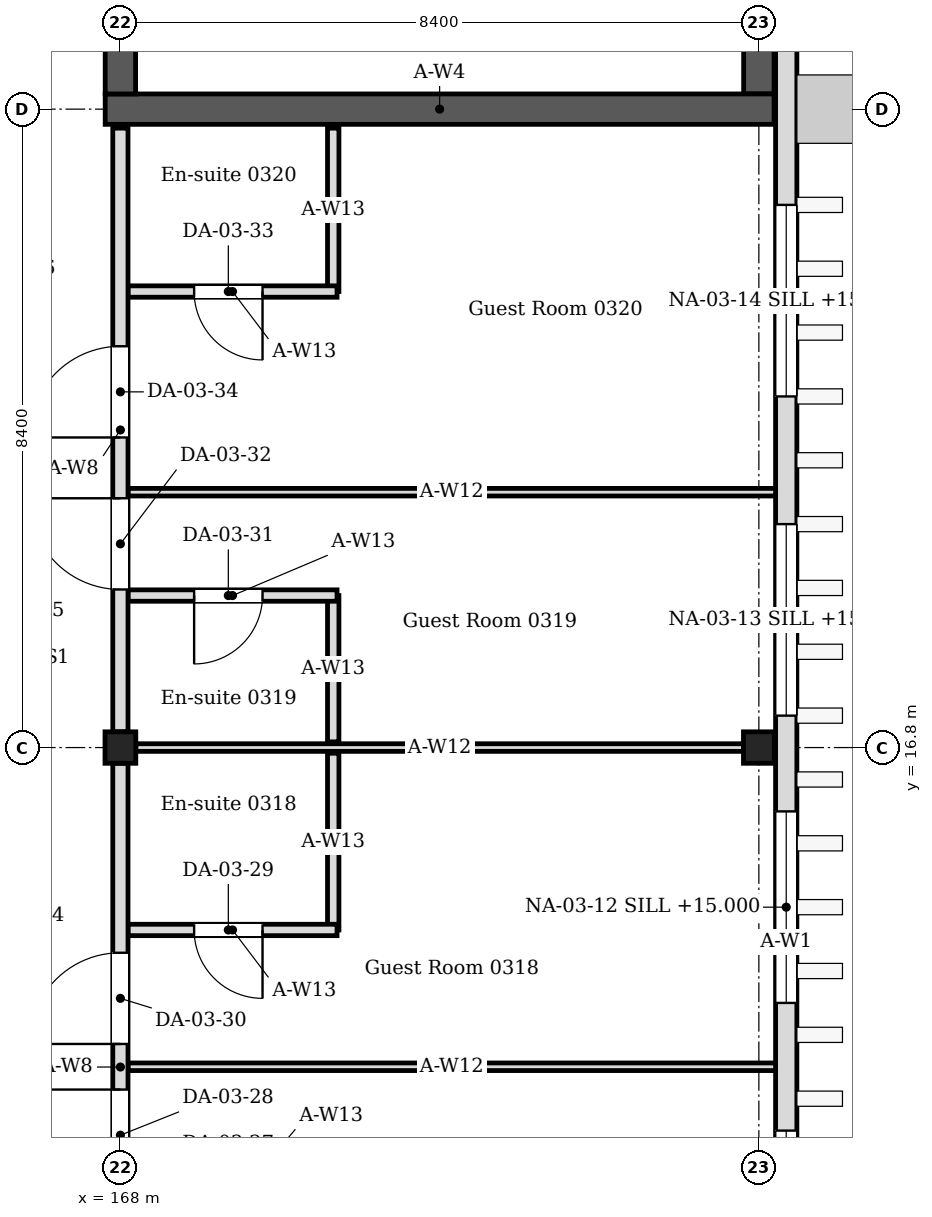
"""IFC4 building model, lengths in metres.
Left out: names, types, materials, properties, quantities, classifications, styles, units other than length and angle.
Written with IfcOpenShell. Run it as: python <this file> out.ifc"""

import sys

from ifc_helpers import new_model, si_unit, direction, frame, frame_2d, origin, origin_2d, place, context, subcontext, project, spatial, rectangle, i_section, extrude, element, fill, save


model = new_model("IFC4")
c1 = context("Model", 3, precision=1e-05, world=origin(), true_north=direction((0.0, 1.0)))
c2 = subcontext(c1, "Body", "Model", "MODEL_VIEW")
j1 = project(units=[si_unit("LENGTHUNIT", "METRE"), si_unit("PLANEANGLEUNIT", "RADIAN")], contexts=[c1])
p1 = place(None, origin())
s1 = spatial("IfcSite", under=j1, at=p1, CompositionType="ELEMENT")
p2 = place(p1, origin())
s2 = spatial("IfcBuilding", under=s1, at=p2, CompositionType="ELEMENT")
p3 = place(p2, frame((0.0, 0.0, 14.4)))
s3 = spatial("IfcBuildingStorey", under=s2, at=p3, CompositionType="ELEMENT", Elevation=14.4)
for number, where, z_axis, x_axis in (
    (1, (168.0, 16.8, 0.0), (0.0, 0.0, 1.0), (1.0, 0.0, 0.0)),
    (2, (176.4, 16.8, 0.0), (0.0, 0.0, 1.0), (1.0, 0.0, 0.0)),
):
    element("IfcColumn", number, at=place(p3, frame(where, z_axis=z_axis, x_axis=x_axis)), inside=s3, PredefinedType="COLUMN", context=c2, shape_type="SweptSolid", body=[
        extrude(i_section(OverallWidth=0.405, OverallDepth=0.414, WebThickness=0.018, FlangeThickness=0.028, FilletRadius=0.022, at=origin_2d()), origin(), (0.0, 0.0, 1.0), 4.2),
    ])
p4 = place(p3, frame((167.8, 25.2, 0.0), z_axis=(0.0, 0.0, 1.0), x_axis=(1.0, 0.0, 0.0)))
e3 = element("IfcWall", 3, at=p4, inside=s3, PredefinedType="SOLIDWALL", context=c2, shape_type="SweptSolid", body=[
    extrude(rectangle(XDim=8.8, YDim=0.4, at=frame_2d((4.4, 0.0))), origin(), (0.0, 0.0, 1.0), 4.05),
])
p5 = place(p3, frame((168.0, 25.4, 0.0), z_axis=(0.0, 0.0, 1.0), x_axis=(0.0, 1.0, 0.0)))
e4 = element("IfcWall", 4, at=p5, inside=s3, PredefinedType="SOLIDWALL", context=c2, shape_type="SweptSolid", body=[
    extrude(rectangle(XDim=16.4, YDim=0.4, at=frame_2d((8.2, 0.0))), origin(), (0.0, 0.0, 1.0), 4.05),
])
p6 = place(p5, frame((1.0, 0.0, 0.0)))
e5 = element("IfcOpeningElement", 5, at=p6, cuts=e4, PredefinedType="OPENING", context=c2, shape_type="SweptSolid", body=[
    extrude(rectangle(XDim=1.0, YDim=2.1, at=frame_2d((0.5, 1.05))), frame((0.0, 0.21, 0.0), z_axis=(0.0, -1.0, 0.0), x_axis=(1.0, 0.0, 0.0)), (0.0, 0.0, 1.0), 0.42),
])
p7 = place(p5, frame((14.4, 0.0, 0.0)))
e6 = element("IfcOpeningElement", 6, at=p7, cuts=e4, PredefinedType="OPENING", context=c2, shape_type="SweptSolid", body=[
    extrude(rectangle(XDim=1.4, YDim=2.1, at=frame_2d((0.7, 1.05))), frame((0.0, 0.21, 0.0), z_axis=(0.0, -1.0, 0.0), x_axis=(1.0, 0.0, 0.0)), (0.0, 0.0, 1.0), 0.42),
])
p8 = place(p3, frame((176.4, 25.4, 0.0), z_axis=(0.0, 0.0, 1.0), x_axis=(0.0, 1.0, 0.0)))
e7 = element("IfcWall", 7, at=p8, inside=s3, PredefinedType="SOLIDWALL", context=c2, shape_type="SweptSolid", body=[
    extrude(rectangle(XDim=16.4, YDim=0.4, at=frame_2d((8.2, 0.0))), origin(), (0.0, 0.0, 1.0), 4.05),
])
p9 = place(p3, frame((176.76, -0.22, 0.0), z_axis=(0.0, 0.0, 1.0), x_axis=(0.0, 1.0, 0.0)))
e8 = element("IfcWall", 8, at=p9, inside=s3, PredefinedType="SOLIDWALL", context=c2, shape_type="SweptSolid", body=[
    extrude(rectangle(XDim=42.57, YDim=0.28, at=frame_2d((21.285, 0.0))), origin(), (0.0, 0.0, 1.0), 4.05),
])
p10 = place(p9, frame((9.46, 0.0, 0.6)))
e9 = element("IfcOpeningElement", 9, at=p10, cuts=e8, PredefinedType="OPENING", context=c2, shape_type="SweptSolid", body=[
    extrude(rectangle(XDim=2.52, YDim=2.4, at=frame_2d((1.26, 1.2))), frame((0.0, 0.15, 0.0), z_axis=(0.0, -1.0, 0.0), x_axis=(1.0, 0.0, 0.0)), (0.0, 0.0, 1.0), 0.3),
])
p11 = place(p9, frame((13.66, 0.0, 0.6)))
e10 = element("IfcOpeningElement", 10, at=p11, cuts=e8, PredefinedType="OPENING", context=c2, shape_type="SweptSolid", body=[
    extrude(rectangle(XDim=2.52, YDim=2.4, at=frame_2d((1.26, 1.2))), frame((0.0, 0.15, 0.0), z_axis=(0.0, -1.0, 0.0), x_axis=(1.0, 0.0, 0.0)), (0.0, 0.0, 1.0), 0.3),
])
p12 = place(p9, frame((17.44, 0.0, 0.6)))
e11 = element("IfcOpeningElement", 11, at=p12, cuts=e8, PredefinedType="OPENING", context=c2, shape_type="SweptSolid", body=[
    extrude(rectangle(XDim=2.52, YDim=2.4, at=frame_2d((1.26, 1.2))), frame((0.0, 0.15, 0.0), z_axis=(0.0, -1.0, 0.0), x_axis=(1.0, 0.0, 0.0)), (0.0, 0.0, 1.0), 0.3),
])
p13 = place(p9, frame((21.64, 0.0, 0.6)))
e12 = element("IfcOpeningElement", 12, at=p13, cuts=e8, PredefinedType="OPENING", context=c2, shape_type="SweptSolid", body=[
    extrude(rectangle(XDim=2.52, YDim=2.4, at=frame_2d((1.26, 1.2))), frame((0.0, 0.15, 0.0), z_axis=(0.0, -1.0, 0.0), x_axis=(1.0, 0.0, 0.0)), (0.0, 0.0, 1.0), 0.3),
])
p14 = place(p3, frame((170.8, 14.4, 0.0), z_axis=(0.0, 0.0, 1.0), x_axis=(0.0, 1.0, 0.0)))
e13 = element("IfcWall", 13, at=p14, inside=s3, PredefinedType="PARTITIONING", context=c2, shape_type="SweptSolid", body=[
    extrude(rectangle(XDim=2.325, YDim=0.15, at=frame_2d((1.163, 0.0))), origin(), (0.0, 0.0, 1.0), 4.05),
])
p15 = place(p3, frame((170.85, 14.4, 0.0), z_axis=(0.0, 0.0, 1.0), x_axis=(-1.0, 0.0, 0.0)))
e14 = element("IfcWall", 14, at=p15, inside=s3, PredefinedType="PARTITIONING", context=c2, shape_type="SweptSolid", body=[
    extrude(rectangle(XDim=2.75, YDim=0.15, at=frame_2d((1.375, 0.0))), origin(), (0.0, 0.0, 1.0), 4.05),
])
p16 = place(p15, frame((0.98, 0.0, 0.0)))
e15 = element("IfcOpeningElement", 15, at=p16, cuts=e14, PredefinedType="OPENING", context=c2, shape_type="SweptSolid", body=[
    extrude(rectangle(XDim=0.9, YDim=2.1, at=frame_2d((0.45, 1.05))), frame((0.0, 0.085, 0.0), z_axis=(0.0, -1.0, 0.0), x_axis=(1.0, 0.0, 0.0)), (0.0, 0.0, 1.0), 0.17),
])
p17 = place(p3, frame((170.8, 16.875, 0.0), z_axis=(0.0, 0.0, 1.0), x_axis=(0.0, 1.0, 0.0)))
e16 = element("IfcWall", 16, at=p17, inside=s3, PredefinedType="PARTITIONING", context=c2, shape_type="SweptSolid", body=[
    extrude(rectangle(XDim=1.925, YDim=0.15, at=frame_2d((0.962, 0.0))), origin(), (0.0, 0.0, 1.0), 4.05),
])
p18 = place(p3, frame((170.85, 18.8, 0.0), z_axis=(0.0, 0.0, 1.0), x_axis=(-1.0, 0.0, 0.0)))
e17 = element("IfcWall", 17, at=p18, inside=s3, PredefinedType="PARTITIONING", context=c2, shape_type="SweptSolid", body=[
    extrude(rectangle(XDim=2.75, YDim=0.15, at=frame_2d((1.375, 0.0))), origin(), (0.0, 0.0, 1.0), 4.05),
])
p19 = place(p18, frame((0.98, 0.0, 0.0)))
e18 = element("IfcOpeningElement", 18, at=p19, cuts=e17, PredefinedType="OPENING", context=c2, shape_type="SweptSolid", body=[
    extrude(rectangle(XDim=0.9, YDim=2.1, at=frame_2d((0.45, 1.05))), frame((0.0, 0.085, 0.0), z_axis=(0.0, -1.0, 0.0), x_axis=(1.0, 0.0, 0.0)), (0.0, 0.0, 1.0), 0.17),
])
p20 = place(p3, frame((170.8, 22.8, 0.0), z_axis=(0.0, 0.0, 1.0), x_axis=(0.0, 1.0, 0.0)))
e19 = element("IfcWall", 19, at=p20, inside=s3, PredefinedType="PARTITIONING", context=c2, shape_type="SweptSolid", body=[
    extrude(rectangle(XDim=2.15, YDim=0.15, at=frame_2d((1.075, 0.0))), origin(), (0.0, 0.0, 1.0), 4.05),
])
p21 = place(p3, frame((170.85, 22.8, 0.0), z_axis=(0.0, 0.0, 1.0), x_axis=(-1.0, 0.0, 0.0)))
e20 = element("IfcWall", 20, at=p21, inside=s3, PredefinedType="PARTITIONING", context=c2, shape_type="SweptSolid", body=[
    extrude(rectangle(XDim=2.75, YDim=0.15, at=frame_2d((1.375, 0.0))), origin(), (0.0, 0.0, 1.0), 4.05),
])
p22 = place(p21, frame((0.98, 0.0, 0.0)))
e21 = element("IfcOpeningElement", 21, at=p22, cuts=e20, PredefinedType="OPENING", context=c2, shape_type="SweptSolid", body=[
    extrude(rectangle(XDim=0.9, YDim=2.1, at=frame_2d((0.45, 1.05))), frame((0.0, 0.085, 0.0), z_axis=(0.0, -1.0, 0.0), x_axis=(1.0, 0.0, 0.0)), (0.0, 0.0, 1.0), 0.17),
])
p23 = place(p3, frame((168.202, 16.8, 0.0), z_axis=(0.0, 0.0, 1.0), x_axis=(1.0, 0.0, 0.0)))
e22 = element("IfcWall", 22, at=p23, inside=s3, PredefinedType="PARTITIONING", context=c2, shape_type="SweptSolid", body=[
    extrude(rectangle(XDim=7.995, YDim=0.1, at=frame_2d((3.998, 0.0))), origin(), (0.0, 0.0, 1.0), 3.604),
])
for number, where, z_axis, x_axis in (
    (23, (168.1, 12.6, 0.0), (0.0, 0.0, 1.0), (1.0, 0.0, 0.0)),
    (24, (168.1, 20.16, 0.0), (0.0, 0.0, 1.0), (1.0, 0.0, 0.0)),
):
    element("IfcWall", number, at=place(p3, frame(where, z_axis=z_axis, x_axis=x_axis)), inside=s3, PredefinedType="PARTITIONING", context=c2, shape_type="SweptSolid", body=[
        extrude(rectangle(XDim=8.52, YDim=0.1, at=frame_2d((4.26, 0.0))), origin(), (0.0, 0.0, 1.0), 3.604),
    ])
p24 = place(p3, frame((168.0, 8.6, 0.0), z_axis=(0.0, 0.0, 1.0), x_axis=(0.0, 1.0, 0.0)))
e25 = element("IfcWall", 25, at=p24, inside=s3, PredefinedType="PARTITIONING", context=c2, shape_type="SweptSolid", body=[
    extrude(rectangle(XDim=7.993, YDim=0.2, at=frame_2d((3.997, 0.0))), origin(), (0.0, 0.0, 1.0), 3.45),
])
p25 = place(p24, frame((2.5, 0.0, 0.0)))
e26 = element("IfcOpeningElement", 26, at=p25, cuts=e25, PredefinedType="OPENING", context=c2, shape_type="SweptSolid", body=[
    extrude(rectangle(XDim=1.2, YDim=2.1, at=frame_2d((0.6, 1.05))), frame((0.0, 0.11, 0.0), z_axis=(0.0, -1.0, 0.0), x_axis=(1.0, 0.0, 0.0)), (0.0, 0.0, 1.0), 0.22),
])
p26 = place(p24, frame((4.3, 0.0, 0.0)))
e27 = element("IfcOpeningElement", 27, at=p26, cuts=e25, PredefinedType="OPENING", context=c2, shape_type="SweptSolid", body=[
    extrude(rectangle(XDim=1.2, YDim=2.1, at=frame_2d((0.6, 1.05))), frame((0.0, 0.11, 0.0), z_axis=(0.0, -1.0, 0.0), x_axis=(1.0, 0.0, 0.0)), (0.0, 0.0, 1.0), 0.22),
])
p27 = place(p3, frame((168.0, 17.007, 0.0), z_axis=(0.0, 0.0, 1.0), x_axis=(0.0, 1.0, 0.0)))
e28 = element("IfcWall", 28, at=p27, inside=s3, PredefinedType="PARTITIONING", context=c2, shape_type="SweptSolid", body=[
    extrude(rectangle(XDim=7.943, YDim=0.2, at=frame_2d((3.971, 0.0))), origin(), (0.0, 0.0, 1.0), 3.45),
])
p28 = place(p27, frame((1.873, 0.0, 0.0)))
e29 = element("IfcOpeningElement", 29, at=p28, cuts=e28, PredefinedType="OPENING", context=c2, shape_type="SweptSolid", body=[
    extrude(rectangle(XDim=1.2, YDim=2.1, at=frame_2d((0.6, 1.05))), frame((0.0, 0.11, 0.0), z_axis=(0.0, -1.0, 0.0), x_axis=(1.0, 0.0, 0.0)), (0.0, 0.0, 1.0), 0.22),
])
p29 = place(p27, frame((3.873, 0.0, 0.0)))
e30 = element("IfcOpeningElement", 30, at=p29, cuts=e28, PredefinedType="OPENING", context=c2, shape_type="SweptSolid", body=[
    extrude(rectangle(XDim=1.2, YDim=2.1, at=frame_2d((0.6, 1.05))), frame((0.0, 0.11, 0.0), z_axis=(0.0, -1.0, 0.0), x_axis=(1.0, 0.0, 0.0)), (0.0, 0.0, 1.0), 0.22),
])
p30 = place(p10, origin())
e31 = element("IfcWindow", 31, at=p30, inside=s3, PartitioningType="SINGLE_PANEL", PredefinedType="WINDOW", context=c2, shape_type="SweptSolid", body=[
    extrude(rectangle(XDim=2.52, YDim=2.4, at=frame_2d((1.26, 1.2))), frame((0.0, 0.03, 0.0), z_axis=(0.0, -1.0, 0.0), x_axis=(1.0, 0.0, 0.0)), (0.0, 0.0, 1.0), 0.06),
])
fill(e9, e31)
p31 = place(p11, origin())
e32 = element("IfcWindow", 32, at=p31, inside=s3, PartitioningType="SINGLE_PANEL", PredefinedType="WINDOW", context=c2, shape_type="SweptSolid", body=[
    extrude(rectangle(XDim=2.52, YDim=2.4, at=frame_2d((1.26, 1.2))), frame((0.0, 0.03, 0.0), z_axis=(0.0, -1.0, 0.0), x_axis=(1.0, 0.0, 0.0)), (0.0, 0.0, 1.0), 0.06),
])
fill(e10, e32)
p32 = place(p12, origin())
e33 = element("IfcWindow", 33, at=p32, inside=s3, PartitioningType="SINGLE_PANEL", PredefinedType="WINDOW", context=c2, shape_type="SweptSolid", body=[
    extrude(rectangle(XDim=2.52, YDim=2.4, at=frame_2d((1.26, 1.2))), frame((0.0, 0.03, 0.0), z_axis=(0.0, -1.0, 0.0), x_axis=(1.0, 0.0, 0.0)), (0.0, 0.0, 1.0), 0.06),
])
fill(e11, e33)
p33 = place(p13, origin())
e34 = element("IfcWindow", 34, at=p33, inside=s3, PartitioningType="SINGLE_PANEL", PredefinedType="WINDOW", context=c2, shape_type="SweptSolid", body=[
    extrude(rectangle(XDim=2.52, YDim=2.4, at=frame_2d((1.26, 1.2))), frame((0.0, 0.03, 0.0), z_axis=(0.0, -1.0, 0.0), x_axis=(1.0, 0.0, 0.0)), (0.0, 0.0, 1.0), 0.06),
])
fill(e12, e34)
p34 = place(p25, origin())
e35 = element("IfcDoor", 35, at=p34, inside=s3, OperationType="SINGLE_SWING_RIGHT", PredefinedType="DOOR", context=c2, shape_type="SweptSolid", body=[
    extrude(rectangle(XDim=1.2, YDim=2.1, at=frame_2d((0.6, 1.05))), frame((0.0, 0.025, 0.0), z_axis=(0.0, -1.0, 0.0), x_axis=(1.0, 0.0, 0.0)), (0.0, 0.0, 1.0), 0.05),
])
fill(e26, e35)
p35 = place(p16, origin())
e36 = element("IfcDoor", 36, at=p35, inside=s3, OperationType="SINGLE_SWING_LEFT", PredefinedType="DOOR", context=c2, shape_type="SweptSolid", body=[
    extrude(rectangle(XDim=0.9, YDim=2.1, at=frame_2d((0.45, 1.05))), frame((0.0, 0.025, 0.0), z_axis=(0.0, -1.0, 0.0), x_axis=(1.0, 0.0, 0.0)), (0.0, 0.0, 1.0), 0.05),
])
fill(e15, e36)
p36 = place(p26, origin())
e37 = element("IfcDoor", 37, at=p36, inside=s3, OperationType="SINGLE_SWING_LEFT", PredefinedType="DOOR", context=c2, shape_type="SweptSolid", body=[
    extrude(rectangle(XDim=1.2, YDim=2.1, at=frame_2d((0.6, 1.05))), frame((0.0, 0.025, 0.0), z_axis=(0.0, -1.0, 0.0), x_axis=(1.0, 0.0, 0.0)), (0.0, 0.0, 1.0), 0.05),
])
fill(e27, e37)
p37 = place(p19, origin())
e38 = element("IfcDoor", 38, at=p37, inside=s3, OperationType="SINGLE_SWING_RIGHT", PredefinedType="DOOR", context=c2, shape_type="SweptSolid", body=[
    extrude(rectangle(XDim=0.9, YDim=2.1, at=frame_2d((0.45, 1.05))), frame((0.0, 0.025, 0.0), z_axis=(0.0, -1.0, 0.0), x_axis=(1.0, 0.0, 0.0)), (0.0, 0.0, 1.0), 0.05),
])
fill(e18, e38)
p38 = place(p28, origin())
e39 = element("IfcDoor", 39, at=p38, inside=s3, OperationType="SINGLE_SWING_RIGHT", PredefinedType="DOOR", context=c2, shape_type="SweptSolid", body=[
    extrude(rectangle(XDim=1.2, YDim=2.1, at=frame_2d((0.6, 1.05))), frame((0.0, 0.025, 0.0), z_axis=(0.0, -1.0, 0.0), x_axis=(1.0, 0.0, 0.0)), (0.0, 0.0, 1.0), 0.05),
])
fill(e29, e39)
p39 = place(p22, origin())
e40 = element("IfcDoor", 40, at=p39, inside=s3, OperationType="SINGLE_SWING_LEFT", PredefinedType="DOOR", context=c2, shape_type="SweptSolid", body=[
    extrude(rectangle(XDim=0.9, YDim=2.1, at=frame_2d((0.45, 1.05))), frame((0.0, 0.025, 0.0), z_axis=(0.0, -1.0, 0.0), x_axis=(1.0, 0.0, 0.0)), (0.0, 0.0, 1.0), 0.05),
])
fill(e21, e40)
p40 = place(p29, origin())
e41 = element("IfcDoor", 41, at=p40, inside=s3, OperationType="SINGLE_SWING_LEFT", PredefinedType="DOOR", context=c2, shape_type="SweptSolid", body=[
    extrude(rectangle(XDim=1.2, YDim=2.1, at=frame_2d((0.6, 1.05))), frame((0.0, 0.025, 0.0), z_axis=(0.0, -1.0, 0.0), x_axis=(1.0, 0.0, 0.0)), (0.0, 0.0, 1.0), 0.05),
])
fill(e30, e41)
save(model, sys.argv[1])
